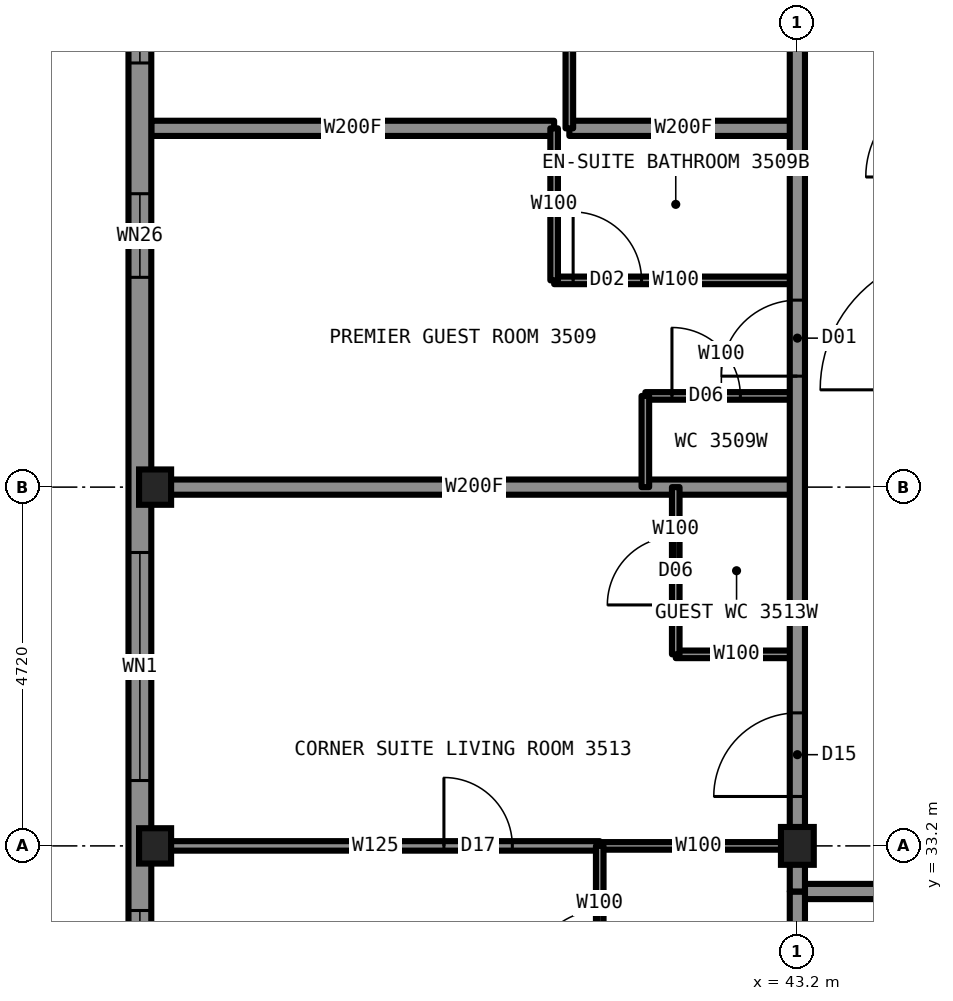
"""IFC4 building model, lengths in metres.
Left out: names, types, materials, properties, quantities, classifications, styles, units other than length and angle.
Written with IfcOpenShell. Run it as: python <this file> out.ifc"""

import sys

from ifc_helpers import new_model, si_unit, direction, frame, frame_2d, origin, origin_2d, place, context, subcontext, project, spatial, rectangle, i_section, extrude, element, fill, save


model = new_model("IFC4")
c1 = context("Model", 3, precision=1e-05, world=origin(), true_north=direction((0.0, 1.0)))
c2 = subcontext(c1, "Body", "Model", "MODEL_VIEW")
j1 = project(units=[si_unit("LENGTHUNIT", "METRE"), si_unit("PLANEANGLEUNIT", "RADIAN")], contexts=[c1])
p1 = place(None, origin())
s1 = spatial("IfcSite", under=j1, at=p1, CompositionType="ELEMENT")
p2 = place(p1, origin())
s2 = spatial("IfcBuilding", under=s1, at=p2, CompositionType="ELEMENT")
p3 = place(p2, frame((0.0, 0.0, 124.9)))
s3 = spatial("IfcBuildingStorey", under=s2, at=p3, CompositionType="ELEMENT", Elevation=124.9)
for number, where, z_axis, x_axis in (
    (1, (34.75, 33.2, 0.0), (0.0, 0.0, 1.0), (1.0, 0.0, 0.0)),
    (2, (34.75, 37.92, 0.0), (0.0, 0.0, 1.0), (1.0, 0.0, 0.0)),
):
    element("IfcColumn", number, at=place(p3, frame(where, z_axis=z_axis, x_axis=x_axis)), inside=s3, PredefinedType="COLUMN", context=c2, shape_type="SweptSolid", body=[
        extrude(i_section(OverallWidth=0.422, OverallDepth=0.465, WebThickness=0.045, FlangeThickness=0.073, at=origin_2d()), origin(), (0.0, 0.0, 1.0), 3.5),
    ])
p4 = place(p3, frame((43.2, 33.2, 0.0), z_axis=(0.0, 0.0, 1.0), x_axis=(1.0, 0.0, 0.0)))
e3 = element("IfcColumn", 3, at=p4, inside=s3, PredefinedType="COLUMN", context=c2, shape_type="SweptSolid", body=[
    extrude(i_section(OverallWidth=0.432, OverallDepth=0.498, WebThickness=0.056, FlangeThickness=0.089, at=origin_2d()), origin(), (0.0, 0.0, 1.0), 3.5),
])
p5 = place(p3, frame((40.6, 33.2, 0.0), z_axis=(0.0, 0.0, 1.0), x_axis=(1.0, 0.0, 0.0)))
e4 = element("IfcWall", 4, at=p5, inside=s3, PredefinedType="PARTITIONING", context=c2, shape_type="SweptSolid", body=[
    extrude(rectangle(XDim=2.6, YDim=0.1, at=frame_2d((1.3, 0.0))), origin(), (0.0, 0.0, 1.0), 2.573),
])
p6 = place(p3, frame((34.7, 33.2, 0.0), z_axis=(0.0, 0.0, 1.0), x_axis=(1.0, 0.0, 0.0)))
e5 = element("IfcWall", 5, at=p6, inside=s3, PredefinedType="PARTITIONING", context=c2, shape_type="SweptSolid", body=[
    extrude(rectangle(XDim=5.9, YDim=0.125, at=frame_2d((2.95, 0.0))), origin(), (0.0, 0.0, 1.0), 2.573),
])
p7 = place(p6, frame((3.85, 0.0, 0.0)))
e6 = element("IfcOpeningElement", 6, at=p7, cuts=e5, PredefinedType="OPENING", context=c2, shape_type="SweptSolid", body=[
    extrude(rectangle(XDim=0.9, YDim=2.2, at=frame_2d((0.45, 1.1))), frame((0.0, 0.073, 0.0), z_axis=(0.0, -1.0, 0.0), x_axis=(1.0, 0.0, 0.0)), (0.0, 0.0, 1.0), 0.145),
])
p8 = place(p3, frame((43.2, 32.6, 0.0), z_axis=(0.0, 0.0, 1.0), x_axis=(1.0, 0.0, 0.0)))
e7 = element("IfcWall", 7, at=p8, inside=s3, PredefinedType="PARTITIONING", context=c2, shape_type="SweptSolid", body=[
    extrude(rectangle(XDim=23.6, YDim=0.2, at=frame_2d((11.8, 0.0))), origin(), (0.0, 0.0, 1.0), 3.33),
])
p9 = place(p8, frame((3.0, 0.0, 0.0)))
e8 = element("IfcOpeningElement", 8, at=p9, cuts=e7, PredefinedType="OPENING", context=c2, shape_type="SweptSolid", body=[
    extrude(rectangle(XDim=1.0, YDim=2.2, at=frame_2d((0.5, 1.1))), frame((0.0, 0.11, 0.0), z_axis=(0.0, -1.0, 0.0), x_axis=(1.0, 0.0, 0.0)), (0.0, 0.0, 1.0), 0.22),
])
p10 = place(p8, frame((11.29, 0.0, 0.0)))
e9 = element("IfcOpeningElement", 9, at=p10, cuts=e7, PredefinedType="OPENING", context=c2, shape_type="SweptSolid", body=[
    extrude(rectangle(XDim=1.1, YDim=2.2, at=frame_2d((0.55, 1.1))), frame((0.0, 0.11, 0.0), z_axis=(0.0, -1.0, 0.0), x_axis=(1.0, 0.0, 0.0)), (0.0, 0.0, 1.0), 0.22),
])
p11 = place(p3, frame((34.7, 42.64, 0.0), z_axis=(0.0, 0.0, 1.0), x_axis=(1.0, 0.0, 0.0)))
e10 = element("IfcWall", 10, at=p11, inside=s3, PredefinedType="PARTITIONING", context=c2, shape_type="SweptSolid", body=[
    extrude(rectangle(XDim=5.3, YDim=0.2, at=frame_2d((2.65, 0.0))), origin(), (0.0, 0.0, 1.0), 2.731),
])
p12 = place(p3, frame((40.2, 42.64, 0.0), z_axis=(0.0, 0.0, 1.0), x_axis=(1.0, 0.0, 0.0)))
e11 = element("IfcWall", 11, at=p12, inside=s3, PredefinedType="PARTITIONING", context=c2, shape_type="SweptSolid", body=[
    extrude(rectangle(XDim=3.0, YDim=0.2, at=frame_2d((1.5, 0.0))), origin(), (0.0, 0.0, 1.0), 2.731),
])
p13 = place(p3, frame((40.0, 40.64, 0.0), z_axis=(0.0, 0.0, 1.0), x_axis=(1.0, 0.0, 0.0)))
e12 = element("IfcWall", 12, at=p13, inside=s3, PredefinedType="PARTITIONING", context=c2, shape_type="SweptSolid", body=[
    extrude(rectangle(XDim=3.2, YDim=0.1, at=frame_2d((1.6, 0.0))), origin(), (0.0, 0.0, 1.0), 3.33),
])
p14 = place(p13, frame((0.25, 0.0, 0.0)))
e13 = element("IfcOpeningElement", 13, at=p14, cuts=e12, PredefinedType="OPENING", context=c2, shape_type="SweptSolid", body=[
    extrude(rectangle(XDim=0.9, YDim=2.1, at=frame_2d((0.45, 1.05))), frame((0.0, 0.06, 0.0), z_axis=(0.0, -1.0, 0.0), x_axis=(1.0, 0.0, 0.0)), (0.0, 0.0, 1.0), 0.12),
])
p15 = place(p3, frame((41.2, 39.12, 0.0), z_axis=(0.0, 0.0, 1.0), x_axis=(1.0, 0.0, 0.0)))
e14 = element("IfcWall", 14, at=p15, inside=s3, PredefinedType="PARTITIONING", context=c2, shape_type="SweptSolid", body=[
    extrude(rectangle(XDim=2.0, YDim=0.1, at=frame_2d((1.0, 0.0))), origin(), (0.0, 0.0, 1.0), 3.33),
])
p16 = place(p15, frame((0.35, 0.0, 0.0)))
e15 = element("IfcOpeningElement", 15, at=p16, cuts=e14, PredefinedType="OPENING", context=c2, shape_type="SweptSolid", body=[
    extrude(rectangle(XDim=0.9, YDim=2.1, at=frame_2d((0.45, 1.05))), frame((0.0, 0.06, 0.0), z_axis=(0.0, -1.0, 0.0), x_axis=(1.0, 0.0, 0.0)), (0.0, 0.0, 1.0), 0.12),
])
p17 = place(p3, frame((34.7, 37.92, 0.0), z_axis=(0.0, 0.0, 1.0), x_axis=(1.0, 0.0, 0.0)))
e16 = element("IfcWall", 16, at=p17, inside=s3, PredefinedType="PARTITIONING", context=c2, shape_type="SweptSolid", body=[
    extrude(rectangle(XDim=8.5, YDim=0.2, at=frame_2d((4.25, 0.0))), origin(), (0.0, 0.0, 1.0), 2.573),
])
p18 = place(p3, frame((41.6, 35.72, 0.0), z_axis=(0.0, 0.0, 1.0), x_axis=(1.0, 0.0, 0.0)))
e17 = element("IfcWall", 17, at=p18, inside=s3, PredefinedType="PARTITIONING", context=c2, shape_type="SweptSolid", body=[
    extrude(rectangle(XDim=1.6, YDim=0.1, at=frame_2d((0.8, 0.0))), origin(), (0.0, 0.0, 1.0), 3.33),
])
p19 = place(p3, frame((43.2, 33.22, 0.0), z_axis=(0.0, 0.0, 1.0), x_axis=(0.0, 1.0, 0.0)))
e18 = element("IfcWall", 18, at=p19, inside=s3, PredefinedType="PARTITIONING", context=c2, shape_type="SweptSolid", body=[
    extrude(rectangle(XDim=23.58, YDim=0.2, at=frame_2d((11.79, 0.0))), origin(), (0.0, 0.0, 1.0), 3.33),
])
p20 = place(p19, frame((6.16, 0.0, 0.0)))
e19 = element("IfcOpeningElement", 19, at=p20, cuts=e18, PredefinedType="OPENING", context=c2, shape_type="SweptSolid", body=[
    extrude(rectangle(XDim=1.0, YDim=2.2, at=frame_2d((0.5, 1.1))), frame((0.0, 0.11, 0.0), z_axis=(0.0, -1.0, 0.0), x_axis=(1.0, 0.0, 0.0)), (0.0, 0.0, 1.0), 0.22),
])
p21 = place(p19, frame((12.42, 0.0, 0.0)))
e20 = element("IfcOpeningElement", 20, at=p21, cuts=e18, PredefinedType="OPENING", context=c2, shape_type="SweptSolid", body=[
    extrude(rectangle(XDim=1.0, YDim=2.2, at=frame_2d((0.5, 1.1))), frame((0.0, 0.11, 0.0), z_axis=(0.0, -1.0, 0.0), x_axis=(1.0, 0.0, 0.0)), (0.0, 0.0, 1.0), 0.22),
])
p22 = place(p19, frame((21.83, 0.0, 0.0)))
e21 = element("IfcOpeningElement", 21, at=p22, cuts=e18, PredefinedType="OPENING", context=c2, shape_type="SweptSolid", body=[
    extrude(rectangle(XDim=1.1, YDim=2.2, at=frame_2d((0.55, 1.1))), frame((0.0, 0.11, 0.0), z_axis=(0.0, -1.0, 0.0), x_axis=(1.0, 0.0, 0.0)), (0.0, 0.0, 1.0), 0.22),
])
p23 = place(p19, frame((0.63, 0.0, 0.0)))
e22 = element("IfcOpeningElement", 22, at=p23, cuts=e18, PredefinedType="OPENING", context=c2, shape_type="SweptSolid", body=[
    extrude(rectangle(XDim=1.1, YDim=2.2, at=frame_2d((0.55, 1.1))), frame((0.0, 0.11, 0.0), z_axis=(0.0, -1.0, 0.0), x_axis=(1.0, 0.0, 0.0)), (0.0, 0.0, 1.0), 0.22),
])
p24 = place(p3, frame((43.2, 24.7, 0.0), z_axis=(0.0, 0.0, 1.0), x_axis=(0.0, 1.0, 0.0)))
e23 = element("IfcWall", 23, at=p24, inside=s3, PredefinedType="PARTITIONING", context=c2, shape_type="SweptSolid", body=[
    extrude(rectangle(XDim=7.9, YDim=0.2, at=frame_2d((3.95, 0.0))), origin(), (0.0, 0.0, 1.0), 2.573),
])
p25 = place(p3, frame((41.6, 35.72, 0.0), z_axis=(0.0, 0.0, 1.0), x_axis=(0.0, 1.0, 0.0)))
e24 = element("IfcWall", 24, at=p25, inside=s3, PredefinedType="PARTITIONING", context=c2, shape_type="SweptSolid", body=[
    extrude(rectangle(XDim=2.2, YDim=0.1, at=frame_2d((1.1, 0.0))), origin(), (0.0, 0.0, 1.0), 3.33),
])
p26 = place(p25, frame((0.65, 0.0, 0.0)))
e25 = element("IfcOpeningElement", 25, at=p26, cuts=e24, PredefinedType="OPENING", context=c2, shape_type="SweptSolid", body=[
    extrude(rectangle(XDim=0.9, YDim=2.1, at=frame_2d((0.45, 1.05))), frame((0.0, 0.06, 0.0), z_axis=(0.0, -1.0, 0.0), x_axis=(1.0, 0.0, 0.0)), (0.0, 0.0, 1.0), 0.12),
])
p27 = place(p3, frame((41.2, 37.92, 0.0), z_axis=(0.0, 0.0, 1.0), x_axis=(0.0, 1.0, 0.0)))
e26 = element("IfcWall", 26, at=p27, inside=s3, PredefinedType="PARTITIONING", context=c2, shape_type="SweptSolid", body=[
    extrude(rectangle(XDim=1.2, YDim=0.1, at=frame_2d((0.6, 0.0))), origin(), (0.0, 0.0, 1.0), 3.33),
])
p28 = place(p3, frame((40.6, 30.6, 0.0), z_axis=(0.0, 0.0, 1.0), x_axis=(0.0, 1.0, 0.0)))
e27 = element("IfcWall", 27, at=p28, inside=s3, PredefinedType="PARTITIONING", context=c2, shape_type="SweptSolid", body=[
    extrude(rectangle(XDim=2.6, YDim=0.1, at=frame_2d((1.3, 0.0))), origin(), (0.0, 0.0, 1.0), 3.33),
])
p29 = place(p28, frame((0.85, 0.0, 0.0)))
e28 = element("IfcOpeningElement", 28, at=p29, cuts=e27, PredefinedType="OPENING", context=c2, shape_type="SweptSolid", body=[
    extrude(rectangle(XDim=0.9, YDim=2.1, at=frame_2d((0.45, 1.05))), frame((0.0, 0.06, 0.0), z_axis=(0.0, -1.0, 0.0), x_axis=(1.0, 0.0, 0.0)), (0.0, 0.0, 1.0), 0.12),
])
p30 = place(p3, frame((40.2, 42.64, 0.0), z_axis=(0.0, 0.0, 1.0), x_axis=(0.0, 1.0, 0.0)))
e29 = element("IfcWall", 29, at=p30, inside=s3, PredefinedType="PARTITIONING", context=c2, shape_type="SweptSolid", body=[
    extrude(rectangle(XDim=2.6, YDim=0.1, at=frame_2d((1.3, 0.0))), origin(), (0.0, 0.0, 1.0), 3.33),
])
p31 = place(p3, frame((40.0, 40.64, 0.0), z_axis=(0.0, 0.0, 1.0), x_axis=(0.0, 1.0, 0.0)))
e30 = element("IfcWall", 30, at=p31, inside=s3, PredefinedType="PARTITIONING", context=c2, shape_type="SweptSolid", body=[
    extrude(rectangle(XDim=2.0, YDim=0.1, at=frame_2d((1.0, 0.0))), origin(), (0.0, 0.0, 1.0), 3.33),
])
p32 = place(p3, frame((34.55, 60.1, 0.0), z_axis=(0.0, 0.0, 1.0), x_axis=(0.0, -1.0, 0.0)))
e31 = element("IfcWall", 31, at=p32, inside=s3, PredefinedType="SOLIDWALL", context=c2, shape_type="SweptSolid", body=[
    extrude(rectangle(XDim=30.2, YDim=0.3, at=frame_2d((15.1, 0.0))), origin(), (0.0, 0.0, 1.0), 2.83),
])
p33 = place(p32, frame((0.85, 0.0, 0.5)))
e32 = element("IfcOpeningElement", 32, at=p33, cuts=e31, PredefinedType="OPENING", context=c2, shape_type="SweptSolid", body=[
    extrude(rectangle(XDim=1.6, YDim=2.0, at=frame_2d((0.8, 1.0))), frame((0.0, 0.16, 0.0), z_axis=(0.0, -1.0, 0.0), x_axis=(1.0, 0.0, 0.0)), (0.0, 0.0, 1.0), 0.32),
])
p34 = place(p32, frame((4.16, 0.0, 0.5)))
e33 = element("IfcOpeningElement", 33, at=p34, cuts=e31, PredefinedType="OPENING", context=c2, shape_type="SweptSolid", body=[
    extrude(rectangle(XDim=3.0, YDim=2.0, at=frame_2d((1.5, 1.0))), frame((0.0, 0.16, 0.0), z_axis=(0.0, -1.0, 0.0), x_axis=(1.0, 0.0, 0.0)), (0.0, 0.0, 1.0), 0.32),
])
p35 = place(p32, frame((8.88, 0.0, 0.5)))
e34 = element("IfcOpeningElement", 34, at=p35, cuts=e31, PredefinedType="OPENING", context=c2, shape_type="SweptSolid", body=[
    extrude(rectangle(XDim=3.0, YDim=2.0, at=frame_2d((1.5, 1.0))), frame((0.0, 0.16, 0.0), z_axis=(0.0, -1.0, 0.0), x_axis=(1.0, 0.0, 0.0)), (0.0, 0.0, 1.0), 0.32),
])
p36 = place(p32, frame((18.32, 0.0, 0.5)))
e35 = element("IfcOpeningElement", 35, at=p36, cuts=e31, PredefinedType="OPENING", context=c2, shape_type="SweptSolid", body=[
    extrude(rectangle(XDim=3.0, YDim=2.0, at=frame_2d((1.5, 1.0))), frame((0.0, 0.16, 0.0), z_axis=(0.0, -1.0, 0.0), x_axis=(1.0, 0.0, 0.0)), (0.0, 0.0, 1.0), 0.32),
])
p37 = place(p32, frame((23.04, 0.0, 0.5)))
e36 = element("IfcOpeningElement", 36, at=p37, cuts=e31, PredefinedType="OPENING", context=c2, shape_type="SweptSolid", body=[
    extrude(rectangle(XDim=3.0, YDim=2.0, at=frame_2d((1.5, 1.0))), frame((0.0, 0.16, 0.0), z_axis=(0.0, -1.0, 0.0), x_axis=(1.0, 0.0, 0.0)), (0.0, 0.0, 1.0), 0.32),
])
p38 = place(p32, frame((27.75, 0.0, 0.5)))
e37 = element("IfcOpeningElement", 37, at=p38, cuts=e31, PredefinedType="OPENING", context=c2, shape_type="SweptSolid", body=[
    extrude(rectangle(XDim=1.6, YDim=2.0, at=frame_2d((0.8, 1.0))), frame((0.0, 0.16, 0.0), z_axis=(0.0, -1.0, 0.0), x_axis=(1.0, 0.0, 0.0)), (0.0, 0.0, 1.0), 0.32),
])
p39 = place(p3, frame((43.2, 32.6, 0.0), z_axis=(0.0, 0.0, 1.0), x_axis=(0.0, 1.0, 0.0)))
e38 = element("IfcWall", 38, at=p39, inside=s3, PredefinedType="PARTITIONING", context=c2, shape_type="SweptSolid", body=[
    extrude(rectangle(XDim=0.62, YDim=0.2, at=frame_2d((0.31, 0.0))), origin(), (0.0, 0.0, 1.0), 2.573),
])
p40 = place(p20, origin())
e39 = element("IfcDoor", 39, at=p40, inside=s3, OperationType="SINGLE_SWING_LEFT", PredefinedType="DOOR", context=c2, shape_type="SweptSolid", body=[
    extrude(rectangle(XDim=1.0, YDim=2.2, at=frame_2d((0.5, 1.1))), frame((0.0, 0.025, 0.0), z_axis=(0.0, -1.0, 0.0), x_axis=(1.0, 0.0, 0.0)), (0.0, 0.0, 1.0), 0.05),
])
fill(e19, e39)
p41 = place(p14, origin())
e40 = element("IfcDoor", 40, at=p41, inside=s3, OperationType="SINGLE_SWING_RIGHT", PredefinedType="DOOR", context=c2, shape_type="SweptSolid", body=[
    extrude(rectangle(XDim=0.9, YDim=2.1, at=frame_2d((0.45, 1.05))), frame((0.0, 0.025, 0.0), z_axis=(0.0, -1.0, 0.0), x_axis=(1.0, 0.0, 0.0)), (0.0, 0.0, 1.0), 0.05),
])
fill(e13, e40)
p42 = place(p16, origin())
e41 = element("IfcDoor", 41, at=p42, inside=s3, OperationType="SINGLE_SWING_LEFT", PredefinedType="DOOR", context=c2, shape_type="SweptSolid", body=[
    extrude(rectangle(XDim=0.9, YDim=2.1, at=frame_2d((0.45, 1.05))), frame((0.0, 0.025, 0.0), z_axis=(0.0, -1.0, 0.0), x_axis=(1.0, 0.0, 0.0)), (0.0, 0.0, 1.0), 0.05),
])
fill(e15, e41)
p43 = place(p23, origin())
e42 = element("IfcDoor", 42, at=p43, inside=s3, OperationType="SINGLE_SWING_LEFT", PredefinedType="DOOR", context=c2, shape_type="SweptSolid", body=[
    extrude(rectangle(XDim=1.1, YDim=2.2, at=frame_2d((0.55, 1.1))), frame((0.0, 0.025, 0.0), z_axis=(0.0, -1.0, 0.0), x_axis=(1.0, 0.0, 0.0)), (0.0, 0.0, 1.0), 0.05),
])
fill(e22, e42)
p44 = place(p29, origin())
e43 = element("IfcDoor", 43, at=p44, inside=s3, OperationType="SINGLE_SWING_RIGHT", PredefinedType="DOOR", context=c2, shape_type="SweptSolid", body=[
    extrude(rectangle(XDim=0.9, YDim=2.1, at=frame_2d((0.45, 1.05))), frame((0.0, 0.025, 0.0), z_axis=(0.0, -1.0, 0.0), x_axis=(1.0, 0.0, 0.0)), (0.0, 0.0, 1.0), 0.05),
])
fill(e28, e43)
p45 = place(p7, origin())
e44 = element("IfcDoor", 44, at=p45, inside=s3, OperationType="SINGLE_SWING_LEFT", PredefinedType="DOOR", context=c2, shape_type="SweptSolid", body=[
    extrude(rectangle(XDim=0.9, YDim=2.2, at=frame_2d((0.45, 1.1))), frame((0.0, 0.025, 0.0), z_axis=(0.0, -1.0, 0.0), x_axis=(1.0, 0.0, 0.0)), (0.0, 0.0, 1.0), 0.05),
])
fill(e6, e44)
p46 = place(p26, origin())
e45 = element("IfcDoor", 45, at=p46, inside=s3, OperationType="SINGLE_SWING_LEFT", PredefinedType="DOOR", context=c2, shape_type="SweptSolid", body=[
    extrude(rectangle(XDim=0.9, YDim=2.1, at=frame_2d((0.45, 1.05))), frame((0.0, 0.025, 0.0), z_axis=(0.0, -1.0, 0.0), x_axis=(1.0, 0.0, 0.0)), (0.0, 0.0, 1.0), 0.05),
])
fill(e25, e45)
p47 = place(p36, origin())
e46 = element("IfcWindow", 46, at=p47, inside=s3, PartitioningType="SINGLE_PANEL", PredefinedType="WINDOW", context=c2, shape_type="SweptSolid", body=[
    extrude(rectangle(XDim=3.0, YDim=2.0, at=frame_2d((1.5, 1.0))), frame((0.0, 0.03, 0.0), z_axis=(0.0, -1.0, 0.0), x_axis=(1.0, 0.0, 0.0)), (0.0, 0.0, 1.0), 0.06),
])
fill(e35, e46)
p48 = place(p37, origin())
e47 = element("IfcWindow", 47, at=p48, inside=s3, PartitioningType="SINGLE_PANEL", PredefinedType="WINDOW", context=c2, shape_type="SweptSolid", body=[
    extrude(rectangle(XDim=3.0, YDim=2.0, at=frame_2d((1.5, 1.0))), frame((0.0, 0.03, 0.0), z_axis=(0.0, -1.0, 0.0), x_axis=(1.0, 0.0, 0.0)), (0.0, 0.0, 1.0), 0.06),
])
fill(e36, e47)
p49 = place(p38, origin())
e48 = element("IfcWindow", 48, at=p49, inside=s3, PartitioningType="SINGLE_PANEL", PredefinedType="WINDOW", context=c2, shape_type="SweptSolid", body=[
    extrude(rectangle(XDim=1.6, YDim=2.0, at=frame_2d((0.8, 1.0))), frame((0.0, 0.03, 0.0), z_axis=(0.0, -1.0, 0.0), x_axis=(1.0, 0.0, 0.0)), (0.0, 0.0, 1.0), 0.06),
])
fill(e37, e48)
save(model, sys.argv[1])
